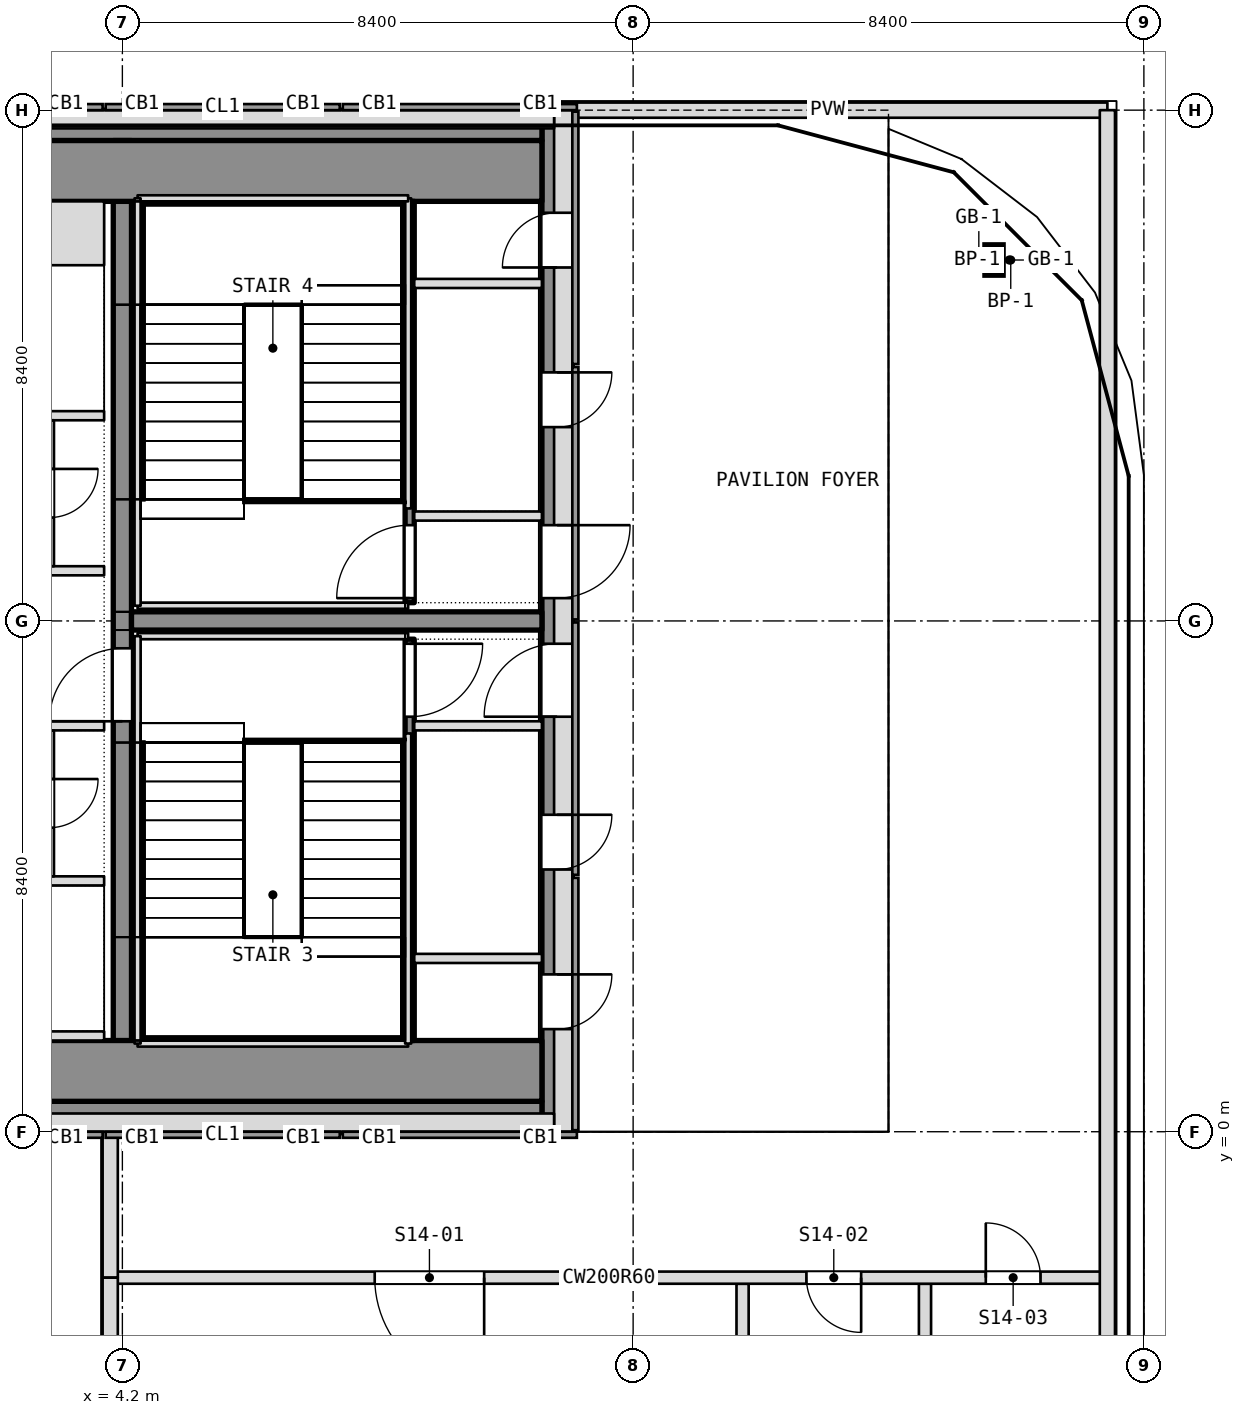
"""IFC4 building model, lengths in metres.
Left out: names, types, materials, properties, quantities, classifications, styles, units other than length and angle.
Written with IfcOpenShell. Run it as: python <this file> out.ifc"""

import sys

from ifc_helpers import new_model, si_unit, direction, frame, frame_2d, origin, origin_2d, place, context, subcontext, project, spatial, rectangle, i_section, extrude, element, fill, save


model = new_model("IFC4")
c1 = context("Model", 3, precision=1e-05, world=origin(), true_north=direction((0.0, 1.0)))
c2 = subcontext(c1, "Body", "Model", "MODEL_VIEW")
j1 = project(units=[si_unit("LENGTHUNIT", "METRE"), si_unit("PLANEANGLEUNIT", "RADIAN")], contexts=[c1])
p1 = place(None, origin())
s1 = spatial("IfcSite", under=j1, at=p1, CompositionType="ELEMENT")
p2 = place(p1, origin())
s2 = spatial("IfcBuilding", under=s1, at=p2, CompositionType="ELEMENT")
p3 = place(p2, frame((0.0, 0.0, 295.7)))
s3 = spatial("IfcBuildingStorey", under=s2, at=p3, CompositionType="ELEMENT", Elevation=295.7)
p4 = place(p3, frame((11.35, 0.0, 0.0), z_axis=(0.0, 0.0, 1.0), x_axis=(0.0, 1.0, 0.0)))
e1 = element("IfcWall", 1, at=p4, inside=s3, PredefinedType="SHEAR", context=c2, shape_type="SweptSolid", body=[
    extrude(rectangle(XDim=16.8, YDim=0.5, at=frame_2d((8.4, 0.0))), origin(), (0.0, 0.0, 1.0), 14.0),
])
p5 = place(p4, frame((1.688, 0.0, 0.0)))
e2 = element("IfcOpeningElement", 2, at=p5, cuts=e1, PredefinedType="OPENING", context=c2, shape_type="SweptSolid", body=[
    extrude(rectangle(XDim=0.9, YDim=2.1, at=frame_2d((0.45, 1.05))), frame((0.0, 0.25, 0.0), z_axis=(0.0, -1.0, 0.0), x_axis=(1.0, 0.0, 0.0)), (0.0, 0.0, 1.0), 0.5),
])
p6 = place(p4, frame((4.312, 0.0, 0.0)))
e3 = element("IfcOpeningElement", 3, at=p6, cuts=e1, PredefinedType="OPENING", context=c2, shape_type="SweptSolid", body=[
    extrude(rectangle(XDim=0.9, YDim=2.1, at=frame_2d((0.45, 1.05))), frame((0.0, 0.25, 0.0), z_axis=(0.0, -1.0, 0.0), x_axis=(1.0, 0.0, 0.0)), (0.0, 0.0, 1.0), 0.5),
])
p7 = place(p4, frame((6.825, 0.0, 0.0)))
e4 = element("IfcOpeningElement", 4, at=p7, cuts=e1, PredefinedType="OPENING", context=c2, shape_type="SweptSolid", body=[
    extrude(rectangle(XDim=1.2, YDim=2.1, at=frame_2d((0.6, 1.05))), frame((0.0, 0.25, 0.0), z_axis=(0.0, -1.0, 0.0), x_axis=(1.0, 0.0, 0.0)), (0.0, 0.0, 1.0), 0.5),
])
p8 = place(p4, frame((14.212, 0.0, 0.0)))
e5 = element("IfcOpeningElement", 5, at=p8, cuts=e1, PredefinedType="OPENING", context=c2, shape_type="SweptSolid", body=[
    extrude(rectangle(XDim=0.9, YDim=2.1, at=frame_2d((0.45, 1.05))), frame((0.0, 0.25, 0.0), z_axis=(0.0, -1.0, 0.0), x_axis=(1.0, 0.0, 0.0)), (0.0, 0.0, 1.0), 0.5),
])
p9 = place(p4, frame((11.587, 0.0, 0.0)))
e6 = element("IfcOpeningElement", 6, at=p9, cuts=e1, PredefinedType="OPENING", context=c2, shape_type="SweptSolid", body=[
    extrude(rectangle(XDim=0.9, YDim=2.1, at=frame_2d((0.45, 1.05))), frame((0.0, 0.25, 0.0), z_axis=(0.0, -1.0, 0.0), x_axis=(1.0, 0.0, 0.0)), (0.0, 0.0, 1.0), 0.5),
])
p10 = place(p4, frame((8.775, 0.0, 0.0)))
e7 = element("IfcOpeningElement", 7, at=p10, cuts=e1, PredefinedType="OPENING", context=c2, shape_type="SweptSolid", body=[
    extrude(rectangle(XDim=1.2, YDim=2.1, at=frame_2d((0.6, 1.05))), frame((0.0, 0.25, 0.0), z_axis=(0.0, -1.0, 0.0), x_axis=(1.0, 0.0, 0.0)), (0.0, 0.0, 1.0), 0.5),
])
for number, where, z_axis, x_axis in (
    (8, (-11.1, 0.25, 0.0), (0.0, 0.0, 1.0), (1.0, 0.0, 0.0)),
    (9, (-11.1, 16.55, 0.0), (0.0, 0.0, 1.0), (1.0, 0.0, 0.0)),
):
    element("IfcWall", number, at=place(p3, frame(where, z_axis=z_axis, x_axis=x_axis)), inside=s3, PredefinedType="SHEAR", context=c2, shape_type="SweptSolid", body=[
        extrude(rectangle(XDim=22.2, YDim=0.5, at=frame_2d((11.1, 0.0))), origin(), (0.0, 0.0, 1.0), 14.0),
    ])
p11 = place(p3, frame((4.2, 0.5, 0.0), z_axis=(0.0, 0.0, 1.0), x_axis=(0.0, 1.0, 0.0)))
e10 = element("IfcWall", 10, at=p11, inside=s3, PredefinedType="SHEAR", context=c2, shape_type="SweptSolid", body=[
    extrude(rectangle(XDim=15.8, YDim=0.3, at=frame_2d((7.9, 0.0))), origin(), (0.0, 0.0, 1.0), 14.0),
])
p12 = place(p11, frame((6.25, 0.0, 0.0)))
e11 = element("IfcOpeningElement", 11, at=p12, cuts=e10, PredefinedType="OPENING", context=c2, shape_type="SweptSolid", body=[
    extrude(rectangle(XDim=1.2, YDim=2.1, at=frame_2d((0.6, 1.05))), frame((0.0, 0.15, 0.0), z_axis=(0.0, -1.0, 0.0), x_axis=(1.0, 0.0, 0.0)), (0.0, 0.0, 1.0), 0.3),
])
p13 = place(p3, frame((4.35, 8.4, 0.0), z_axis=(0.0, 0.0, 1.0), x_axis=(1.0, 0.0, 0.0)))
e12 = element("IfcWall", 12, at=p13, inside=s3, PredefinedType="SHEAR", context=c2, shape_type="SweptSolid", body=[
    extrude(rectangle(XDim=6.75, YDim=0.3, at=frame_2d((3.375, 0.0))), origin(), (0.0, 0.0, 1.0), 14.0),
])
p14 = place(p3, frame((18.535, 14.335, -0.3), z_axis=(0.0, 0.0, 1.0), x_axis=(1.0, 0.0, 0.0)))
e13 = element("IfcColumn", 13, at=p14, inside=s3, PredefinedType="COLUMN", context=c2, shape_type="SweptSolid", body=[
    extrude(i_section(OverallWidth=0.3, OverallDepth=0.5, WebThickness=0.014, FlangeThickness=0.028, FilletRadius=0.027, at=origin_2d()), origin(), (0.0, 0.0, 1.0), 8.15),
])
for number, where, z_axis, x_axis in (
    (14, (17.4, -7.5, 0.0), (0.0, 0.0, 1.0), (0.0, 1.0, 0.0)),
    (15, (14.4, -7.5, 0.0), (0.0, 0.0, 1.0), (0.0, 1.0, 0.0)),
):
    element("IfcWall", number, at=place(p3, frame(where, z_axis=z_axis, x_axis=x_axis)), inside=s3, PredefinedType="PARTITIONING", context=c2, shape_type="SweptSolid", body=[
        extrude(rectangle(XDim=5.0, YDim=0.2, at=frame_2d((2.5, 0.0))), origin(), (0.0, 0.0, 1.0), 7.82),
    ])
p15 = place(p3, frame((4.0, -2.4, 0.0), z_axis=(0.0, 0.0, 1.0), x_axis=(1.0, 0.0, 0.0)))
e16 = element("IfcWall", 16, at=p15, inside=s3, PredefinedType="PARTITIONING", context=c2, shape_type="SweptSolid", body=[
    extrude(rectangle(XDim=16.4, YDim=0.2, at=frame_2d((8.2, 0.0))), origin(), (0.0, 0.0, 1.0), 7.82),
])
p16 = place(p15, frame((4.35, 0.0, 0.0)))
e17 = element("IfcOpeningElement", 17, at=p16, cuts=e16, PredefinedType="OPENING", context=c2, shape_type="SweptSolid", body=[
    extrude(rectangle(XDim=1.8, YDim=2.1, at=frame_2d((0.9, 1.05))), frame((0.0, 0.1, 0.0), z_axis=(0.0, -1.0, 0.0), x_axis=(1.0, 0.0, 0.0)), (0.0, 0.0, 1.0), 0.2),
])
p17 = place(p15, frame((11.45, 0.0, 0.0)))
e18 = element("IfcOpeningElement", 18, at=p17, cuts=e16, PredefinedType="OPENING", context=c2, shape_type="SweptSolid", body=[
    extrude(rectangle(XDim=0.9, YDim=2.1, at=frame_2d((0.45, 1.05))), frame((0.0, 0.1, 0.0), z_axis=(0.0, -1.0, 0.0), x_axis=(1.0, 0.0, 0.0)), (0.0, 0.0, 1.0), 0.2),
])
p18 = place(p15, frame((14.4, 0.0, 0.0)))
e19 = element("IfcOpeningElement", 19, at=p18, cuts=e16, PredefinedType="OPENING", context=c2, shape_type="SweptSolid", body=[
    extrude(rectangle(XDim=0.9, YDim=2.1, at=frame_2d((0.45, 1.05))), frame((0.0, 0.1, 0.0), z_axis=(0.0, -1.0, 0.0), x_axis=(1.0, 0.0, 0.0)), (0.0, 0.0, 1.0), 0.2),
])
p19 = place(p3, frame((4.0, -2.4, 0.0), z_axis=(0.0, 0.0, 1.0), x_axis=(0.0, 1.0, 0.0)))
e20 = element("IfcWall", 20, at=p19, inside=s3, PredefinedType="SOLIDWALL", context=c2, shape_type="SweptSolid", body=[
    extrude(rectangle(XDim=2.4, YDim=0.25, at=frame_2d((1.2, 0.0))), origin(), (0.0, 0.0, 1.0), 7.82),
])
p20 = place(p3, frame((11.2, 16.8, 0.0), z_axis=(0.0, 0.0, 1.0), x_axis=(1.0, 0.0, 0.0)))
e21 = element("IfcWall", 21, at=p20, inside=s3, PredefinedType="SOLIDWALL", context=c2, shape_type="SweptSolid", body=[
    extrude(rectangle(XDim=9.2, YDim=0.25, at=frame_2d((4.6, 0.0))), origin(), (0.0, 0.0, 1.0), 7.82),
])
p21 = place(p3, frame((20.4, 16.8, 0.0), z_axis=(0.0, 0.0, 1.0), x_axis=(0.0, -1.0, 0.0)))
e22 = element("IfcWall", 22, at=p21, inside=s3, PredefinedType="SOLIDWALL", context=c2, shape_type="SweptSolid", body=[
    extrude(rectangle(XDim=24.3, YDim=0.25, at=frame_2d((12.15, 0.0))), origin(), (0.0, 0.0, 1.0), 7.82),
])
p22 = place(p3, frame((4.0, -7.5, 0.0), z_axis=(0.0, 0.0, 1.0), x_axis=(0.0, 1.0, 0.0)))
e23 = element("IfcWall", 23, at=p22, inside=s3, PredefinedType="SOLIDWALL", context=c2, shape_type="SweptSolid", body=[
    extrude(rectangle(XDim=5.1, YDim=0.25, at=frame_2d((2.55, 0.0))), origin(), (0.0, 0.0, 1.0), 7.82),
])
for number, where, z_axis, x_axis in (
    (24, (-11.1, 1.0, 0.0), (0.0, 0.0, 1.0), (1.0, 0.0, 0.0)),
    (25, (-11.1, 15.8, 0.0), (0.0, 0.0, 1.0), (1.0, 0.0, 0.0)),
):
    element("IfcWall", number, at=place(p3, frame(where, z_axis=z_axis, x_axis=x_axis)), inside=s3, PredefinedType="PARTITIONING", context=c2, shape_type="SweptSolid", body=[
        extrude(rectangle(XDim=22.2, YDim=1.0, at=frame_2d((11.1, 0.0))), origin(), (0.0, 0.0, 1.0), 13.7),
    ])
p23 = place(p3, frame((8.925, 1.5, 0.0), z_axis=(0.0, 0.0, 1.0), x_axis=(0.0, 1.0, 0.0)))
e26 = element("IfcWall", 26, at=p23, inside=s3, PredefinedType="SHEAR", context=c2, shape_type="SweptSolid", body=[
    extrude(rectangle(XDim=6.6, YDim=0.15, at=frame_2d((3.3, 0.0))), origin(), (0.0, 0.0, 1.0), 13.7),
])
p24 = place(p23, frame((5.325, 0.0, 0.0)))
e27 = element("IfcOpeningElement", 27, at=p24, cuts=e26, PredefinedType="OPENING", context=c2, shape_type="SweptSolid", body=[
    extrude(rectangle(XDim=1.2, YDim=2.1, at=frame_2d((0.6, 1.05))), frame((0.0, 0.075, 0.0), z_axis=(0.0, -1.0, 0.0), x_axis=(1.0, 0.0, 0.0)), (0.0, 0.0, 1.0), 0.15),
])
for number, where, z_axis, x_axis in (
    (28, (9.0, 6.675, 0.0), (0.0, 0.0, 1.0), (1.0, 0.0, 0.0)),
    (29, (9.0, 2.85, 0.0), (0.0, 0.0, 1.0), (1.0, 0.0, 0.0)),
):
    element("IfcWall", number, at=place(p3, frame(where, z_axis=z_axis, x_axis=x_axis)), inside=s3, PredefinedType="PARTITIONING", context=c2, shape_type="SweptSolid", body=[
        extrude(rectangle(XDim=2.1, YDim=0.15, at=frame_2d((1.05, 0.0))), origin(), (0.0, 0.0, 1.0), 13.7),
    ])
p25 = place(p3, frame((8.925, 8.7, 0.0), z_axis=(0.0, 0.0, 1.0), x_axis=(0.0, 1.0, 0.0)))
e30 = element("IfcWall", 30, at=p25, inside=s3, PredefinedType="SHEAR", context=c2, shape_type="SweptSolid", body=[
    extrude(rectangle(XDim=6.6, YDim=0.15, at=frame_2d((3.3, 0.0))), origin(), (0.0, 0.0, 1.0), 13.7),
])
p26 = place(p25, frame((0.075, 0.0, 0.0)))
e31 = element("IfcOpeningElement", 31, at=p26, cuts=e30, PredefinedType="OPENING", context=c2, shape_type="SweptSolid", body=[
    extrude(rectangle(XDim=1.2, YDim=2.1, at=frame_2d((0.6, 1.05))), frame((0.0, 0.075, 0.0), z_axis=(0.0, -1.0, 0.0), x_axis=(1.0, 0.0, 0.0)), (0.0, 0.0, 1.0), 0.15),
])
for number, where, z_axis, x_axis in (
    (32, (9.0, 10.125, 0.0), (0.0, 0.0, 1.0), (1.0, 0.0, 0.0)),
    (33, (9.0, 13.95, 0.0), (0.0, 0.0, 1.0), (1.0, 0.0, 0.0)),
):
    element("IfcWall", number, at=place(p3, frame(where, z_axis=z_axis, x_axis=x_axis)), inside=s3, PredefinedType="PARTITIONING", context=c2, shape_type="SweptSolid", body=[
        extrude(rectangle(XDim=2.1, YDim=0.15, at=frame_2d((1.05, 0.0))), origin(), (0.0, 0.0, 1.0), 13.7),
    ])
p27 = place(p3, frame((-3.9, 4.125, 0.0), z_axis=(0.0, 0.0, 1.0), x_axis=(1.0, 0.0, 0.0)))
e34 = element("IfcWall", 34, at=p27, inside=s3, PredefinedType="PARTITIONING", context=c2, shape_type="SweptSolid", body=[
    extrude(rectangle(XDim=7.8, YDim=0.15, at=frame_2d((3.9, 0.0))), origin(), (0.0, 0.0, 1.0), 13.7),
])
p28 = place(p27, frame((3.75, 0.0, 0.0)))
e35 = element("IfcOpeningElement", 35, at=p28, cuts=e34, PredefinedType="OPENING", context=c2, shape_type="SweptSolid", body=[
    extrude(rectangle(XDim=1.2, YDim=2.1, at=frame_2d((0.6, 1.05))), frame((0.0, 0.075, 0.0), z_axis=(0.0, -1.0, 0.0), x_axis=(1.0, 0.0, 0.0)), (0.0, 0.0, 1.0), 0.15),
])
p29 = place(p3, frame((-3.9, 11.775, 0.0), z_axis=(0.0, 0.0, 1.0), x_axis=(1.0, 0.0, 0.0)))
e36 = element("IfcWall", 36, at=p29, inside=s3, PredefinedType="PARTITIONING", context=c2, shape_type="SweptSolid", body=[
    extrude(rectangle(XDim=7.8, YDim=0.15, at=frame_2d((3.9, 0.0))), origin(), (0.0, 0.0, 1.0), 13.7),
])
p30 = place(p29, frame((3.3, 0.0, 0.0)))
e37 = element("IfcOpeningElement", 37, at=p30, cuts=e36, PredefinedType="OPENING", context=c2, shape_type="SweptSolid", body=[
    extrude(rectangle(XDim=1.2, YDim=2.1, at=frame_2d((0.6, 1.05))), frame((0.0, 0.075, 0.0), z_axis=(0.0, -1.0, 0.0), x_axis=(1.0, 0.0, 0.0)), (0.0, 0.0, 1.0), 0.15),
])
p31 = place(p3, frame((1.65, 1.575, 0.0), z_axis=(0.0, 0.0, 1.0), x_axis=(1.0, 0.0, 0.0)))
e38 = element("IfcWall", 38, at=p31, inside=s3, PredefinedType="SHEAR", context=c2, shape_type="SweptSolid", body=[
    extrude(rectangle(XDim=2.25, YDim=0.15, at=frame_2d((1.125, 0.0))), origin(), (0.0, 0.0, 1.0), 13.7),
])
p32 = place(p3, frame((1.65, 14.775, 0.0), z_axis=(0.0, 0.0, 1.0), x_axis=(1.0, 0.0, 0.0)))
e39 = element("IfcWall", 39, at=p32, inside=s3, PredefinedType="SHEAR", context=c2, shape_type="SweptSolid", body=[
    extrude(rectangle(XDim=2.25, YDim=1.05, at=frame_2d((1.125, 0.0))), origin(), (0.0, 0.0, 1.0), 13.7),
])
for number, where, z_axis, x_axis in (
    (40, (1.65, 6.675, 0.0), (0.0, 0.0, 1.0), (1.0, 0.0, 0.0)),
    (41, (1.65, 9.225, 0.0), (0.0, 0.0, 1.0), (1.0, 0.0, 0.0)),
):
    element("IfcWall", number, at=place(p3, frame(where, z_axis=z_axis, x_axis=x_axis)), inside=s3, PredefinedType="PARTITIONING", context=c2, shape_type="SweptSolid", body=[
        extrude(rectangle(XDim=2.25, YDim=0.15, at=frame_2d((1.125, 0.0))), origin(), (0.0, 0.0, 1.0), 13.7),
    ])
p33 = place(p3, frame((3.0, 4.2, 0.0), z_axis=(0.0, 0.0, 1.0), x_axis=(0.0, 1.0, 0.0)))
e42 = element("IfcWall", 42, at=p33, inside=s3, PredefinedType="PARTITIONING", context=c2, shape_type="SweptSolid", body=[
    extrude(rectangle(XDim=2.4, YDim=0.15, at=frame_2d((1.2, 0.0))), origin(), (0.0, 0.0, 1.0), 13.7),
])
p34 = place(p33, frame((0.8, 0.0, 0.0)))
e43 = element("IfcOpeningElement", 43, at=p34, cuts=e42, PredefinedType="OPENING", context=c2, shape_type="SweptSolid", body=[
    extrude(rectangle(XDim=0.8, YDim=2.1, at=frame_2d((0.4, 1.05))), frame((0.0, 0.075, 0.0), z_axis=(0.0, -1.0, 0.0), x_axis=(1.0, 0.0, 0.0)), (0.0, 0.0, 1.0), 0.15),
])
p35 = place(p3, frame((3.0, 9.3, 0.0), z_axis=(0.0, 0.0, 1.0), x_axis=(0.0, 1.0, 0.0)))
e44 = element("IfcWall", 44, at=p35, inside=s3, PredefinedType="PARTITIONING", context=c2, shape_type="SweptSolid", body=[
    extrude(rectangle(XDim=2.4, YDim=0.15, at=frame_2d((1.2, 0.0))), origin(), (0.0, 0.0, 1.0), 13.7),
])
p36 = place(p35, frame((0.8, 0.0, 0.0)))
e45 = element("IfcOpeningElement", 45, at=p36, cuts=e44, PredefinedType="OPENING", context=c2, shape_type="SweptSolid", body=[
    extrude(rectangle(XDim=0.8, YDim=2.1, at=frame_2d((0.4, 1.05))), frame((0.0, 0.075, 0.0), z_axis=(0.0, -1.0, 0.0), x_axis=(1.0, 0.0, 0.0)), (0.0, 0.0, 1.0), 0.15),
])
p37 = place(p16, origin())
e46 = element("IfcDoor", 46, at=p37, inside=s3, OperationType="DOUBLE_DOOR_SINGLE_SWING", PredefinedType="DOOR", context=c2, shape_type="SweptSolid", body=[
    extrude(rectangle(XDim=1.8, YDim=2.1, at=frame_2d((0.9, 1.05))), frame((0.0, 0.025, 0.0), z_axis=(0.0, -1.0, 0.0), x_axis=(1.0, 0.0, 0.0)), (0.0, 0.0, 1.0), 0.05),
])
fill(e17, e46)
p38 = place(p17, origin())
e47 = element("IfcDoor", 47, at=p38, inside=s3, OperationType="SINGLE_SWING_RIGHT", PredefinedType="DOOR", context=c2, shape_type="SweptSolid", body=[
    extrude(rectangle(XDim=0.9, YDim=2.1, at=frame_2d((0.45, 1.05))), frame((0.0, 0.025, 0.0), z_axis=(0.0, -1.0, 0.0), x_axis=(1.0, 0.0, 0.0)), (0.0, 0.0, 1.0), 0.05),
])
fill(e18, e47)
p39 = place(p18, origin())
e48 = element("IfcDoor", 48, at=p39, inside=s3, OperationType="SINGLE_SWING_RIGHT", PredefinedType="DOOR", context=c2, shape_type="SweptSolid", body=[
    extrude(rectangle(XDim=0.9, YDim=2.1, at=frame_2d((0.45, 1.05))), frame((0.0, 0.025, 0.0), z_axis=(0.0, -1.0, 0.0), x_axis=(1.0, 0.0, 0.0)), (0.0, 0.0, 1.0), 0.05),
])
fill(e19, e48)
p40 = place(p5, origin())
e49 = element("IfcDoor", 49, at=p40, inside=s3, OperationType="SINGLE_SWING_LEFT", PredefinedType="DOOR", context=c2, shape_type="SweptSolid", body=[
    extrude(rectangle(XDim=0.9, YDim=2.1, at=frame_2d((0.45, 1.05))), frame((0.0, 0.025, 0.0), z_axis=(0.0, -1.0, 0.0), x_axis=(1.0, 0.0, 0.0)), (0.0, 0.0, 1.0), 0.05),
])
fill(e2, e49)
p41 = place(p6, origin())
e50 = element("IfcDoor", 50, at=p41, inside=s3, OperationType="SINGLE_SWING_LEFT", PredefinedType="DOOR", context=c2, shape_type="SweptSolid", body=[
    extrude(rectangle(XDim=0.9, YDim=2.1, at=frame_2d((0.45, 1.05))), frame((0.0, 0.025, 0.0), z_axis=(0.0, -1.0, 0.0), x_axis=(1.0, 0.0, 0.0)), (0.0, 0.0, 1.0), 0.05),
])
fill(e3, e50)
p42 = place(p7, origin())
e51 = element("IfcDoor", 51, at=p42, inside=s3, OperationType="SINGLE_SWING_LEFT", PredefinedType="DOOR", context=c2, shape_type="SweptSolid", body=[
    extrude(rectangle(XDim=1.2, YDim=2.1, at=frame_2d((0.6, 1.05))), frame((0.0, 0.025, 0.0), z_axis=(0.0, -1.0, 0.0), x_axis=(1.0, 0.0, 0.0)), (0.0, 0.0, 1.0), 0.05),
])
fill(e4, e51)
p43 = place(p24, origin())
e52 = element("IfcDoor", 52, at=p43, inside=s3, OperationType="SINGLE_SWING_LEFT", PredefinedType="DOOR", context=c2, shape_type="SweptSolid", body=[
    extrude(rectangle(XDim=1.2, YDim=2.1, at=frame_2d((0.6, 1.05))), frame((0.0, 0.025, 0.0), z_axis=(0.0, -1.0, 0.0), x_axis=(1.0, 0.0, 0.0)), (0.0, 0.0, 1.0), 0.05),
])
fill(e27, e52)
p44 = place(p8, origin())
e53 = element("IfcDoor", 53, at=p44, inside=s3, OperationType="SINGLE_SWING_LEFT", PredefinedType="DOOR", context=c2, shape_type="SweptSolid", body=[
    extrude(rectangle(XDim=0.9, YDim=2.1, at=frame_2d((0.45, 1.05))), frame((0.0, 0.025, 0.0), z_axis=(0.0, -1.0, 0.0), x_axis=(1.0, 0.0, 0.0)), (0.0, 0.0, 1.0), 0.05),
])
fill(e5, e53)
p45 = place(p9, origin())
e54 = element("IfcDoor", 54, at=p45, inside=s3, OperationType="SINGLE_SWING_LEFT", PredefinedType="DOOR", context=c2, shape_type="SweptSolid", body=[
    extrude(rectangle(XDim=0.9, YDim=2.1, at=frame_2d((0.45, 1.05))), frame((0.0, 0.025, 0.0), z_axis=(0.0, -1.0, 0.0), x_axis=(1.0, 0.0, 0.0)), (0.0, 0.0, 1.0), 0.05),
])
fill(e6, e54)
p46 = place(p10, origin())
e55 = element("IfcDoor", 55, at=p46, inside=s3, OperationType="SINGLE_SWING_LEFT", PredefinedType="DOOR", context=c2, shape_type="SweptSolid", body=[
    extrude(rectangle(XDim=1.2, YDim=2.1, at=frame_2d((0.6, 1.05))), frame((0.0, 0.025, 0.0), z_axis=(0.0, -1.0, 0.0), x_axis=(1.0, 0.0, 0.0)), (0.0, 0.0, 1.0), 0.05),
])
fill(e7, e55)
p47 = place(p26, origin())
e56 = element("IfcDoor", 56, at=p47, inside=s3, OperationType="SINGLE_SWING_LEFT", PredefinedType="DOOR", context=c2, shape_type="SweptSolid", body=[
    extrude(rectangle(XDim=1.2, YDim=2.1, at=frame_2d((0.6, 1.05))), frame((0.0, 0.025, 0.0), z_axis=(0.0, -1.0, 0.0), x_axis=(1.0, 0.0, 0.0)), (0.0, 0.0, 1.0), 0.05),
])
fill(e31, e56)
p48 = place(p12, origin())
e57 = element("IfcDoor", 57, at=p48, inside=s3, OperationType="SINGLE_SWING_LEFT", PredefinedType="DOOR", context=c2, shape_type="SweptSolid", body=[
    extrude(rectangle(XDim=1.2, YDim=2.1, at=frame_2d((0.6, 1.05))), frame((0.0, 0.025, 0.0), z_axis=(0.0, -1.0, 0.0), x_axis=(1.0, 0.0, 0.0)), (0.0, 0.0, 1.0), 0.05),
])
fill(e11, e57)
save(model, sys.argv[1])
